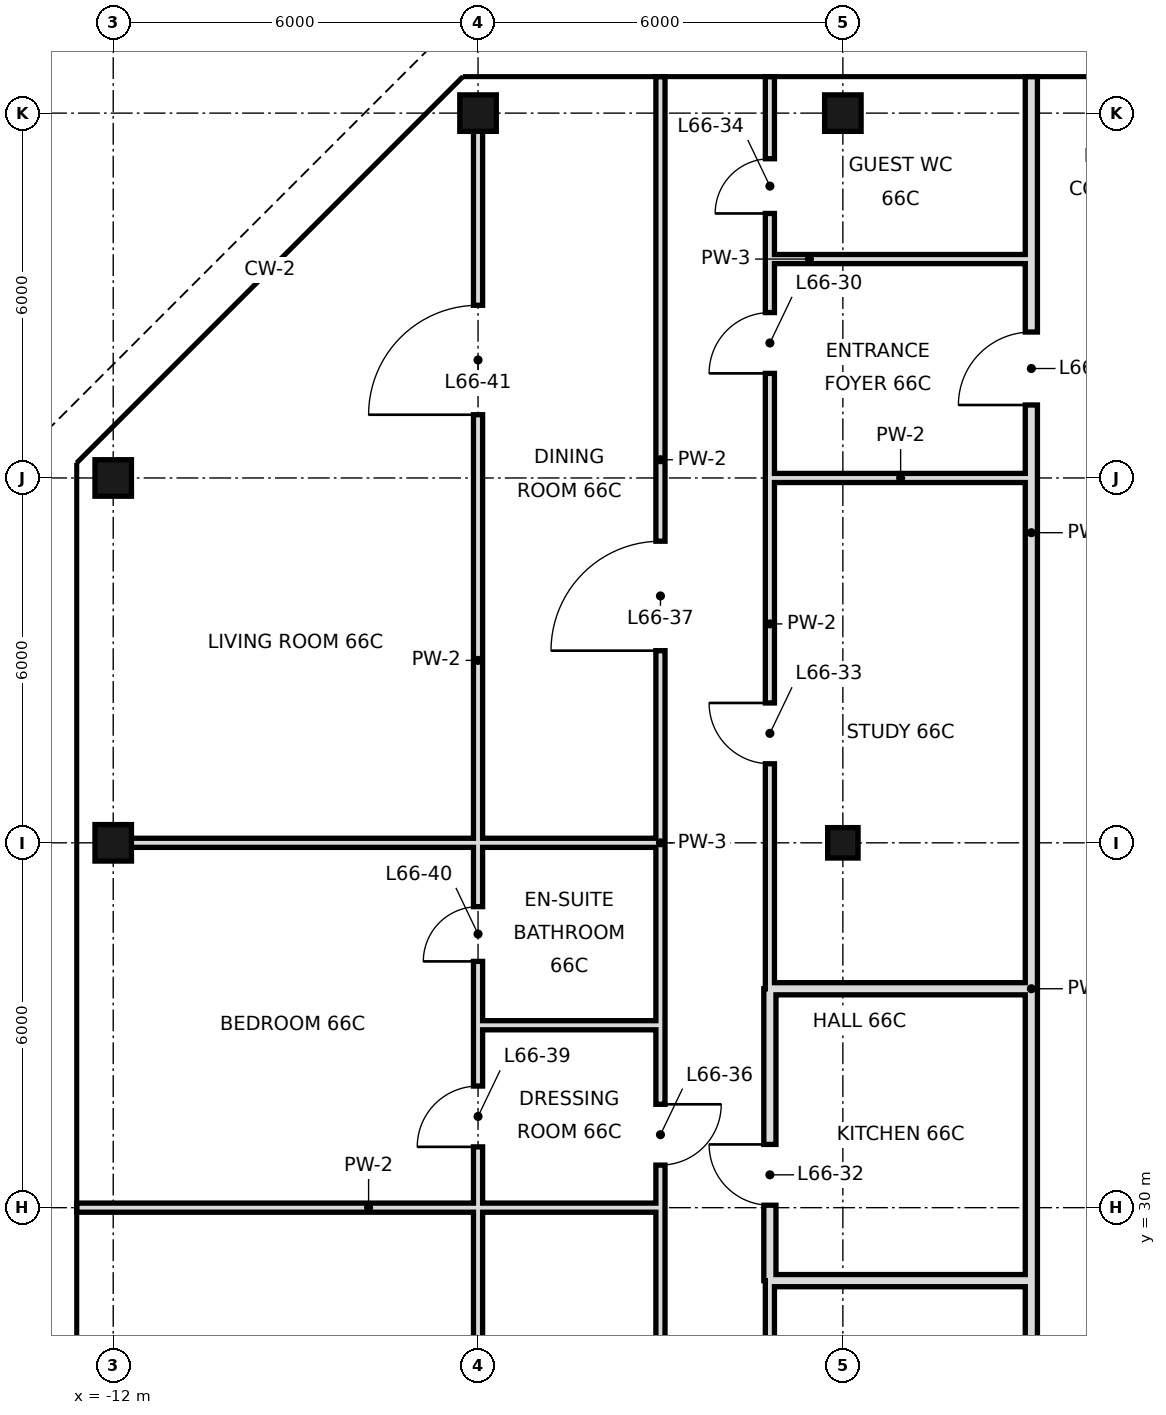
"""IFC4 building model, lengths in metres.
Left out: names, types, materials, properties, quantities, classifications, styles, units other than length and angle.
Written with IfcOpenShell. Run it as: python <this file> out.ifc"""

import sys

from ifc_helpers import new_model, si_unit, direction, frame, frame_2d, origin, origin_2d, place, context, subcontext, project, spatial, rectangle, hollow_rectangle, extrude, element, fill, save


model = new_model("IFC4")
c1 = context("Model", 3, precision=1e-05, world=origin(), true_north=direction((0.0, 1.0)))
c2 = subcontext(c1, "Body", "Model", "MODEL_VIEW")
j1 = project(units=[si_unit("LENGTHUNIT", "METRE"), si_unit("PLANEANGLEUNIT", "RADIAN")], contexts=[c1])
p1 = place(None, origin())
s1 = spatial("IfcSite", under=j1, at=p1, CompositionType="ELEMENT")
p2 = place(p1, origin())
s2 = spatial("IfcBuilding", under=s1, at=p2, CompositionType="ELEMENT")
p3 = place(p2, frame((0.0, 0.0, 277.4)))
s3 = spatial("IfcBuildingStorey", under=s2, at=p3, CompositionType="ELEMENT", Elevation=277.4)
for number, where, z_axis, x_axis in (
    (1, (-12.0, 36.0, 0.0), (0.0, 0.0, 1.0), (1.0, 0.0, 0.0)),
    (2, (-12.0, 42.0, 0.0), (0.0, 0.0, 1.0), (1.0, 0.0, 0.0)),
    (3, (-6.0, 48.0, 0.0), (0.0, 0.0, 1.0), (1.0, 0.0, 0.0)),
):
    element("IfcColumn", number, at=place(p3, frame(where, z_axis=z_axis, x_axis=x_axis)), inside=s3, PredefinedType="COLUMN", context=c2, shape_type="SweptSolid", body=[
        extrude(hollow_rectangle(XDim=0.6, YDim=0.6, WallThickness=0.028, at=origin_2d()), origin(), (0.0, 0.0, 1.0), 4.4),
    ])
p4 = place(p3, frame((0.0, 36.0, 0.0), z_axis=(0.0, 0.0, 1.0), x_axis=(1.0, 0.0, 0.0)))
e4 = element("IfcColumn", 4, at=p4, inside=s3, PredefinedType="COLUMN", context=c2, shape_type="SweptSolid", body=[
    extrude(hollow_rectangle(XDim=0.5, YDim=0.5, WallThickness=0.025, at=origin_2d()), origin(), (0.0, 0.0, 1.0), 4.4),
])
p5 = place(p3, frame((0.0, 48.0, 0.0), z_axis=(0.0, 0.0, 1.0), x_axis=(1.0, 0.0, 0.0)))
e5 = element("IfcColumn", 5, at=p5, inside=s3, PredefinedType="COLUMN", context=c2, shape_type="SweptSolid", body=[
    extrude(hollow_rectangle(XDim=0.6, YDim=0.6, WallThickness=0.028, at=origin_2d()), origin(), (0.0, 0.0, 1.0), 4.4),
])
p6 = place(p3, frame((-1.2, 28.8, 0.0), z_axis=(0.0, 0.0, 1.0), x_axis=(0.0, 1.0, 0.0)))
e6 = element("IfcWall", 6, at=p6, inside=s3, PredefinedType="SOLIDWALL", context=c2, shape_type="SweptSolid", body=[
    extrude(rectangle(XDim=4.8, YDim=0.2, at=frame_2d((2.4, 0.0))), origin(), (0.0, 0.0, 1.0), 3.4),
])
p7 = place(p6, frame((1.24, 0.0, 0.0)))
e7 = element("IfcOpeningElement", 7, at=p7, cuts=e6, PredefinedType="OPENING", context=c2, shape_type="SweptSolid", body=[
    extrude(rectangle(XDim=1.0, YDim=2.4, at=frame_2d((0.5, 1.2))), frame((0.0, 0.11, 0.0), z_axis=(0.0, -1.0, 0.0), x_axis=(1.0, 0.0, 0.0)), (0.0, 0.0, 1.0), 0.22),
])
p8 = place(p3, frame((-1.2, 18.0, 0.0), z_axis=(0.0, 0.0, 1.0), x_axis=(0.0, 1.0, 0.0)))
e8 = element("IfcWall", 8, at=p8, inside=s3, PredefinedType="PARTITIONING", context=c2, shape_type="SweptSolid", body=[
    extrude(rectangle(XDim=10.8, YDim=0.15, at=frame_2d((5.4, 0.0))), origin(), (0.0, 0.0, 1.0), 4.1),
])
p9 = place(p8, frame((6.76, 0.0, 0.0)))
e9 = element("IfcOpeningElement", 9, at=p9, cuts=e8, PredefinedType="OPENING", context=c2, shape_type="SweptSolid", body=[
    extrude(rectangle(XDim=1.0, YDim=2.4, at=frame_2d((0.5, 1.2))), frame((0.0, 0.085, 0.0), z_axis=(0.0, -1.0, 0.0), x_axis=(1.0, 0.0, 0.0)), (0.0, 0.0, 1.0), 0.17),
])
p10 = place(p3, frame((-1.2, 33.6, 0.0), z_axis=(0.0, 0.0, 1.0), x_axis=(0.0, 1.0, 0.0)))
e10 = element("IfcWall", 10, at=p10, inside=s3, PredefinedType="PARTITIONING", context=c2, shape_type="SweptSolid", body=[
    extrude(rectangle(XDim=12.0, YDim=0.15, at=frame_2d((6.0, 0.0))), origin(), (0.0, 0.0, 1.0), 4.1),
])
p11 = place(p10, frame((10.12, 0.0, 0.0)))
e11 = element("IfcOpeningElement", 11, at=p11, cuts=e10, PredefinedType="OPENING", context=c2, shape_type="SweptSolid", body=[
    extrude(rectangle(XDim=1.0, YDim=2.4, at=frame_2d((0.5, 1.2))), frame((0.0, 0.085, 0.0), z_axis=(0.0, -1.0, 0.0), x_axis=(1.0, 0.0, 0.0)), (0.0, 0.0, 1.0), 0.17),
])
p12 = place(p10, frame((3.7, 0.0, 0.0)))
e12 = element("IfcOpeningElement", 12, at=p12, cuts=e10, PredefinedType="OPENING", context=c2, shape_type="SweptSolid", body=[
    extrude(rectangle(XDim=1.0, YDim=2.4, at=frame_2d((0.5, 1.2))), frame((0.0, 0.085, 0.0), z_axis=(0.0, -1.0, 0.0), x_axis=(1.0, 0.0, 0.0)), (0.0, 0.0, 1.0), 0.17),
])
p13 = place(p3, frame((-1.2, 45.6, 0.0), z_axis=(0.0, 0.0, 1.0), x_axis=(0.0, 1.0, 0.0)))
e13 = element("IfcWall", 13, at=p13, inside=s3, PredefinedType="PARTITIONING", context=c2, shape_type="SweptSolid", body=[
    extrude(rectangle(XDim=3.0, YDim=0.15, at=frame_2d((1.5, 0.0))), origin(), (0.0, 0.0, 1.0), 4.1),
])
p14 = place(p13, frame((0.75, 0.0, 0.0)))
e14 = element("IfcOpeningElement", 14, at=p14, cuts=e13, PredefinedType="OPENING", context=c2, shape_type="SweptSolid", body=[
    extrude(rectangle(XDim=0.9, YDim=2.4, at=frame_2d((0.45, 1.2))), frame((0.0, 0.085, 0.0), z_axis=(0.0, -1.0, 0.0), x_axis=(1.0, 0.0, 0.0)), (0.0, 0.0, 1.0), 0.17),
])
p15 = place(p3, frame((-3.0, 18.0, 0.0), z_axis=(0.0, 0.0, 1.0), x_axis=(0.0, 1.0, 0.0)))
e15 = element("IfcWall", 15, at=p15, inside=s3, PredefinedType="PARTITIONING", context=c2, shape_type="SweptSolid", body=[
    extrude(rectangle(XDim=15.0, YDim=0.15, at=frame_2d((7.5, 0.0))), origin(), (0.0, 0.0, 1.0), 4.1),
])
p16 = place(p15, frame((7.6, 0.0, 0.0)))
e16 = element("IfcOpeningElement", 16, at=p16, cuts=e15, PredefinedType="OPENING", context=c2, shape_type="SweptSolid", body=[
    extrude(rectangle(XDim=1.0, YDim=2.4, at=frame_2d((0.5, 1.2))), frame((0.0, 0.085, 0.0), z_axis=(0.0, -1.0, 0.0), x_axis=(1.0, 0.0, 0.0)), (0.0, 0.0, 1.0), 0.17),
])
p17 = place(p15, frame((12.7, 0.0, 0.0)))
e17 = element("IfcOpeningElement", 17, at=p17, cuts=e15, PredefinedType="OPENING", context=c2, shape_type="SweptSolid", body=[
    extrude(rectangle(XDim=1.0, YDim=2.4, at=frame_2d((0.5, 1.2))), frame((0.0, 0.085, 0.0), z_axis=(0.0, -1.0, 0.0), x_axis=(1.0, 0.0, 0.0)), (0.0, 0.0, 1.0), 0.17),
])
p18 = place(p3, frame((-3.0, 36.0, 0.0), z_axis=(0.0, 0.0, 1.0), x_axis=(0.0, 1.0, 0.0)))
e18 = element("IfcWall", 18, at=p18, inside=s3, PredefinedType="PARTITIONING", context=c2, shape_type="SweptSolid", body=[
    extrude(rectangle(XDim=12.6, YDim=0.15, at=frame_2d((6.3, 0.0))), origin(), (0.0, 0.0, 1.0), 4.1),
])
p19 = place(p18, frame((3.16, 0.0, 0.0)))
e19 = element("IfcOpeningElement", 19, at=p19, cuts=e18, PredefinedType="OPENING", context=c2, shape_type="SweptSolid", body=[
    extrude(rectangle(XDim=1.8, YDim=2.4, at=frame_2d((0.9, 1.2))), frame((0.0, 0.085, 0.0), z_axis=(0.0, -1.0, 0.0), x_axis=(1.0, 0.0, 0.0)), (0.0, 0.0, 1.0), 0.17),
])
p20 = place(p3, frame((-3.0, 33.0, 0.0), z_axis=(0.0, 0.0, 1.0), x_axis=(0.0, 1.0, 0.0)))
e20 = element("IfcWall", 20, at=p20, inside=s3, PredefinedType="PARTITIONING", context=c2, shape_type="SweptSolid", body=[
    extrude(rectangle(XDim=3.0, YDim=0.15, at=frame_2d((1.5, 0.0))), origin(), (0.0, 0.0, 1.0), 4.1),
])
p21 = place(p3, frame((-6.0, 18.0, 0.0), z_axis=(0.0, 0.0, 1.0), x_axis=(0.0, 1.0, 0.0)))
e21 = element("IfcWall", 21, at=p21, inside=s3, PredefinedType="PARTITIONING", context=c2, shape_type="SweptSolid", body=[
    extrude(rectangle(XDim=15.0, YDim=0.15, at=frame_2d((7.5, 0.0))), origin(), (0.0, 0.0, 1.0), 4.1),
])
p22 = place(p21, frame((3.4, 0.0, 0.0)))
e22 = element("IfcOpeningElement", 22, at=p22, cuts=e21, PredefinedType="OPENING", context=c2, shape_type="SweptSolid", body=[
    extrude(rectangle(XDim=1.0, YDim=2.4, at=frame_2d((0.5, 1.2))), frame((0.0, 0.085, 0.0), z_axis=(0.0, -1.0, 0.0), x_axis=(1.0, 0.0, 0.0)), (0.0, 0.0, 1.0), 0.17),
])
p23 = place(p21, frame((13.0, 0.0, 0.0)))
e23 = element("IfcOpeningElement", 23, at=p23, cuts=e21, PredefinedType="OPENING", context=c2, shape_type="SweptSolid", body=[
    extrude(rectangle(XDim=1.0, YDim=2.4, at=frame_2d((0.5, 1.2))), frame((0.0, 0.085, 0.0), z_axis=(0.0, -1.0, 0.0), x_axis=(1.0, 0.0, 0.0)), (0.0, 0.0, 1.0), 0.17),
])
p24 = place(p3, frame((-6.0, 36.0, 0.0), z_axis=(0.0, 0.0, 1.0), x_axis=(0.0, 1.0, 0.0)))
e24 = element("IfcWall", 24, at=p24, inside=s3, PredefinedType="PARTITIONING", context=c2, shape_type="SweptSolid", body=[
    extrude(rectangle(XDim=12.0, YDim=0.15, at=frame_2d((6.0, 0.0))), origin(), (0.0, 0.0, 1.0), 4.1),
])
p25 = place(p24, frame((7.04, 0.0, 0.0)))
e25 = element("IfcOpeningElement", 25, at=p25, cuts=e24, PredefinedType="OPENING", context=c2, shape_type="SweptSolid", body=[
    extrude(rectangle(XDim=1.8, YDim=2.4, at=frame_2d((0.9, 1.2))), frame((0.0, 0.085, 0.0), z_axis=(0.0, -1.0, 0.0), x_axis=(1.0, 0.0, 0.0)), (0.0, 0.0, 1.0), 0.17),
])
p26 = place(p3, frame((-6.0, 33.0, 0.0), z_axis=(0.0, 0.0, 1.0), x_axis=(0.0, 1.0, 0.0)))
e26 = element("IfcWall", 26, at=p26, inside=s3, PredefinedType="PARTITIONING", context=c2, shape_type="SweptSolid", body=[
    extrude(rectangle(XDim=3.0, YDim=0.15, at=frame_2d((1.5, 0.0))), origin(), (0.0, 0.0, 1.0), 4.1),
])
p27 = place(p26, frame((1.05, 0.0, 0.0)))
e27 = element("IfcOpeningElement", 27, at=p27, cuts=e26, PredefinedType="OPENING", context=c2, shape_type="SweptSolid", body=[
    extrude(rectangle(XDim=0.9, YDim=2.4, at=frame_2d((0.45, 1.2))), frame((0.0, 0.085, 0.0), z_axis=(0.0, -1.0, 0.0), x_axis=(1.0, 0.0, 0.0)), (0.0, 0.0, 1.0), 0.17),
])
p28 = place(p3, frame((3.1, 18.7, 0.0), z_axis=(0.0, 0.0, 1.0), x_axis=(0.0, 1.0, 0.0)))
e28 = element("IfcWall", 28, at=p28, inside=s3, PredefinedType="SOLIDWALL", context=c2, shape_type="SweptSolid", body=[
    extrude(rectangle(XDim=10.1, YDim=0.2, at=frame_2d((5.05, 0.0))), origin(), (0.0, 0.0, 1.0), 4.1),
])
p29 = place(p3, frame((3.1, 33.6, 0.0), z_axis=(0.0, 0.0, 1.0), x_axis=(0.0, 1.0, 0.0)))
e29 = element("IfcWall", 29, at=p29, inside=s3, PredefinedType="SOLIDWALL", context=c2, shape_type="SweptSolid", body=[
    extrude(rectangle(XDim=15.0, YDim=0.2, at=frame_2d((7.5, 0.0))), origin(), (0.0, 0.0, 1.0), 3.4),
])
p30 = place(p29, frame((9.6, 0.0, 0.0)))
e30 = element("IfcOpeningElement", 30, at=p30, cuts=e29, PredefinedType="OPENING", context=c2, shape_type="SweptSolid", body=[
    extrude(rectangle(XDim=1.2, YDim=2.4, at=frame_2d((0.6, 1.2))), frame((0.0, 0.11, 0.0), z_axis=(0.0, -1.0, 0.0), x_axis=(1.0, 0.0, 0.0)), (0.0, 0.0, 1.0), 0.22),
])
p31 = place(p3, frame((3.1, 28.8, 0.0), z_axis=(0.0, 0.0, 1.0), x_axis=(0.0, 1.0, 0.0)))
e31 = element("IfcWall", 31, at=p31, inside=s3, PredefinedType="SOLIDWALL", context=c2, shape_type="SweptSolid", body=[
    extrude(rectangle(XDim=4.8, YDim=0.2, at=frame_2d((2.4, 0.0))), origin(), (0.0, 0.0, 1.0), 3.65),
])
p32 = place(p3, frame((-1.2, 28.8, 0.0), z_axis=(0.0, 0.0, 1.0), x_axis=(1.0, 0.0, 0.0)))
e32 = element("IfcWall", 32, at=p32, inside=s3, PredefinedType="SOLIDWALL", context=c2, shape_type="SweptSolid", body=[
    extrude(rectangle(XDim=4.3, YDim=0.2, at=frame_2d((2.15, 0.0))), origin(), (0.0, 0.0, 1.0), 3.4),
])
p33 = place(p3, frame((-12.6, 30.0, 0.0), z_axis=(0.0, 0.0, 1.0), x_axis=(1.0, 0.0, 0.0)))
e33 = element("IfcWall", 33, at=p33, inside=s3, PredefinedType="PARTITIONING", context=c2, shape_type="SweptSolid", body=[
    extrude(rectangle(XDim=9.6, YDim=0.15, at=frame_2d((4.8, 0.0))), origin(), (0.0, 0.0, 1.0), 3.4),
])
p34 = place(p3, frame((-6.0, 33.0, 0.0), z_axis=(0.0, 0.0, 1.0), x_axis=(1.0, 0.0, 0.0)))
e34 = element("IfcWall", 34, at=p34, inside=s3, PredefinedType="PARTITIONING", context=c2, shape_type="SweptSolid", body=[
    extrude(rectangle(XDim=3.0, YDim=0.15, at=frame_2d((1.5, 0.0))), origin(), (0.0, 0.0, 1.0), 4.1),
])
p35 = place(p3, frame((-1.2, 33.6, 0.0), z_axis=(0.0, 0.0, 1.0), x_axis=(1.0, 0.0, 0.0)))
e35 = element("IfcWall", 35, at=p35, inside=s3, PredefinedType="SOLIDWALL", context=c2, shape_type="SweptSolid", body=[
    extrude(rectangle(XDim=4.3, YDim=0.2, at=frame_2d((2.15, 0.0))), origin(), (0.0, 0.0, 1.0), 3.4),
])
p36 = place(p3, frame((-12.0, 36.0, 0.0), z_axis=(0.0, 0.0, 1.0), x_axis=(1.0, 0.0, 0.0)))
e36 = element("IfcWall", 36, at=p36, inside=s3, PredefinedType="PARTITIONING", context=c2, shape_type="SweptSolid", body=[
    extrude(rectangle(XDim=6.0, YDim=0.15, at=frame_2d((3.0, 0.0))), origin(), (0.0, 0.0, 1.0), 3.4),
])
p37 = place(p3, frame((-6.0, 36.0, 0.0), z_axis=(0.0, 0.0, 1.0), x_axis=(1.0, 0.0, 0.0)))
e37 = element("IfcWall", 37, at=p37, inside=s3, PredefinedType="PARTITIONING", context=c2, shape_type="SweptSolid", body=[
    extrude(rectangle(XDim=3.0, YDim=0.15, at=frame_2d((1.5, 0.0))), origin(), (0.0, 0.0, 1.0), 3.4),
])
p38 = place(p3, frame((-1.2, 42.0, 0.0), z_axis=(0.0, 0.0, 1.0), x_axis=(1.0, 0.0, 0.0)))
e38 = element("IfcWall", 38, at=p38, inside=s3, PredefinedType="PARTITIONING", context=c2, shape_type="SweptSolid", body=[
    extrude(rectangle(XDim=4.3, YDim=0.15, at=frame_2d((2.15, 0.0))), origin(), (0.0, 0.0, 1.0), 3.4),
])
p39 = place(p3, frame((-1.2, 45.6, 0.0), z_axis=(0.0, 0.0, 1.0), x_axis=(1.0, 0.0, 0.0)))
e39 = element("IfcWall", 39, at=p39, inside=s3, PredefinedType="PARTITIONING", context=c2, shape_type="SweptSolid", body=[
    extrude(rectangle(XDim=4.3, YDim=0.15, at=frame_2d((2.15, 0.0))), origin(), (0.0, 0.0, 1.0), 4.1),
])
p40 = place(p11, origin())
e40 = element("IfcDoor", 40, at=p40, inside=s3, OperationType="SINGLE_SWING_LEFT", PredefinedType="DOOR", context=c2, shape_type="SweptSolid", body=[
    extrude(rectangle(XDim=1.0, YDim=2.4, at=frame_2d((0.5, 1.2))), frame((0.0, 0.025, 0.0), z_axis=(0.0, -1.0, 0.0), x_axis=(1.0, 0.0, 0.0)), (0.0, 0.0, 1.0), 0.05),
])
fill(e11, e40)
p41 = place(p7, frame((1.0, 0.0, 0.0), z_axis=(0.0, 0.0, 1.0), x_axis=(-1.0, 0.0, 0.0)))
e41 = element("IfcDoor", 41, at=p41, inside=s3, OperationType="SINGLE_SWING_LEFT", PredefinedType="DOOR", context=c2, shape_type="SweptSolid", body=[
    extrude(rectangle(XDim=1.0, YDim=2.4, at=frame_2d((0.5, 1.2))), frame((0.0, 0.025, 0.0), z_axis=(0.0, -1.0, 0.0), x_axis=(1.0, 0.0, 0.0)), (0.0, 0.0, 1.0), 0.05),
])
fill(e7, e41)
p42 = place(p12, frame((1.0, 0.0, 0.0), z_axis=(0.0, 0.0, 1.0), x_axis=(-1.0, 0.0, 0.0)))
e42 = element("IfcDoor", 42, at=p42, inside=s3, OperationType="SINGLE_SWING_LEFT", PredefinedType="DOOR", context=c2, shape_type="SweptSolid", body=[
    extrude(rectangle(XDim=1.0, YDim=2.4, at=frame_2d((0.5, 1.2))), frame((0.0, 0.025, 0.0), z_axis=(0.0, -1.0, 0.0), x_axis=(1.0, 0.0, 0.0)), (0.0, 0.0, 1.0), 0.05),
])
fill(e12, e42)
p43 = place(p14, origin())
e43 = element("IfcDoor", 43, at=p43, inside=s3, OperationType="SINGLE_SWING_LEFT", PredefinedType="DOOR", context=c2, shape_type="SweptSolid", body=[
    extrude(rectangle(XDim=0.9, YDim=2.4, at=frame_2d((0.45, 1.2))), frame((0.0, 0.025, 0.0), z_axis=(0.0, -1.0, 0.0), x_axis=(1.0, 0.0, 0.0)), (0.0, 0.0, 1.0), 0.05),
])
fill(e14, e43)
p44 = place(p17, origin())
e44 = element("IfcDoor", 44, at=p44, inside=s3, OperationType="SINGLE_SWING_RIGHT", PredefinedType="DOOR", context=c2, shape_type="SweptSolid", body=[
    extrude(rectangle(XDim=1.0, YDim=2.4, at=frame_2d((0.5, 1.2))), frame((0.0, 0.025, 0.0), z_axis=(0.0, -1.0, 0.0), x_axis=(1.0, 0.0, 0.0)), (0.0, 0.0, 1.0), 0.05),
])
fill(e17, e44)
p45 = place(p19, origin())
e45 = element("IfcDoor", 45, at=p45, inside=s3, OperationType="SINGLE_SWING_LEFT", PredefinedType="DOOR", context=c2, shape_type="SweptSolid", body=[
    extrude(rectangle(XDim=1.8, YDim=2.4, at=frame_2d((0.9, 1.2))), frame((0.0, 0.025, 0.0), z_axis=(0.0, -1.0, 0.0), x_axis=(1.0, 0.0, 0.0)), (0.0, 0.0, 1.0), 0.05),
])
fill(e19, e45)
p46 = place(p23, origin())
e46 = element("IfcDoor", 46, at=p46, inside=s3, OperationType="SINGLE_SWING_LEFT", PredefinedType="DOOR", context=c2, shape_type="SweptSolid", body=[
    extrude(rectangle(XDim=1.0, YDim=2.4, at=frame_2d((0.5, 1.2))), frame((0.0, 0.025, 0.0), z_axis=(0.0, -1.0, 0.0), x_axis=(1.0, 0.0, 0.0)), (0.0, 0.0, 1.0), 0.05),
])
fill(e23, e46)
p47 = place(p27, origin())
e47 = element("IfcDoor", 47, at=p47, inside=s3, OperationType="SINGLE_SWING_LEFT", PredefinedType="DOOR", context=c2, shape_type="SweptSolid", body=[
    extrude(rectangle(XDim=0.9, YDim=2.4, at=frame_2d((0.45, 1.2))), frame((0.0, 0.025, 0.0), z_axis=(0.0, -1.0, 0.0), x_axis=(1.0, 0.0, 0.0)), (0.0, 0.0, 1.0), 0.05),
])
fill(e27, e47)
p48 = place(p25, origin())
e48 = element("IfcDoor", 48, at=p48, inside=s3, OperationType="SINGLE_SWING_LEFT", PredefinedType="DOOR", context=c2, shape_type="SweptSolid", body=[
    extrude(rectangle(XDim=1.8, YDim=2.4, at=frame_2d((0.9, 1.2))), frame((0.0, 0.025, 0.0), z_axis=(0.0, -1.0, 0.0), x_axis=(1.0, 0.0, 0.0)), (0.0, 0.0, 1.0), 0.05),
])
fill(e25, e48)
p49 = place(p30, origin())
e49 = element("IfcDoor", 49, at=p49, inside=s3, OperationType="SINGLE_SWING_LEFT", PredefinedType="DOOR", context=c2, shape_type="SweptSolid", body=[
    extrude(rectangle(XDim=1.2, YDim=2.4, at=frame_2d((0.6, 1.2))), frame((0.0, 0.025, 0.0), z_axis=(0.0, -1.0, 0.0), x_axis=(1.0, 0.0, 0.0)), (0.0, 0.0, 1.0), 0.05),
])
fill(e30, e49)
save(model, sys.argv[1])
